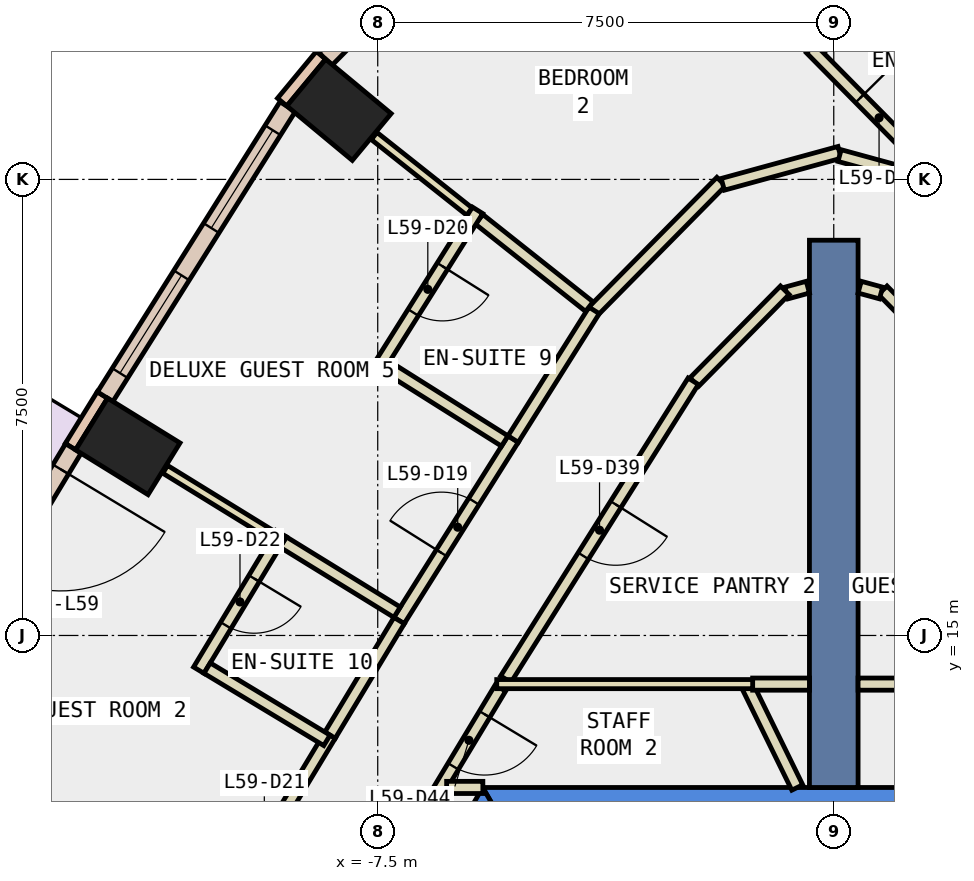
"""IFC4 building model, lengths in metres.
Left out: names, types, materials, properties, quantities, classifications, styles, units other than length and angle.
Written with IfcOpenShell. Run it as: python <this file> out.ifc"""

import sys

from ifc_helpers import new_model, si_unit, direction, frame, frame_2d, origin, origin_2d, place, context, subcontext, project, spatial, polyline, rectangle, outline, extrude, element, fill, save


model = new_model("IFC4")
c1 = context("Model", 3, precision=1e-05, world=origin(), true_north=direction((0.0, 1.0)))
c2 = subcontext(c1, "Body", "Model", "MODEL_VIEW")
j1 = project(units=[si_unit("LENGTHUNIT", "METRE"), si_unit("PLANEANGLEUNIT", "RADIAN")], contexts=[c1])
p1 = place(None, origin())
s1 = spatial("IfcSite", under=j1, at=p1, CompositionType="ELEMENT")
p2 = place(p1, origin())
s2 = spatial("IfcBuilding", under=s1, at=p2, CompositionType="ELEMENT")
p3 = place(p2, frame((0.0, 0.0, 259.4)))
s3 = spatial("IfcBuildingStorey", under=s2, at=p3, CompositionType="ELEMENT", Elevation=259.4)
for number, where, z_axis, x_axis in (
    (1, (-8.137, 23.645, -0.34), (0.0, 0.0, 1.0), (0.639, 0.769, 0.0)),
    (2, (-11.61, 18.109, -0.34), (0.0, 0.0, 1.0), (0.526, 0.851, 0.0)),
):
    element("IfcColumn", number, at=place(p3, frame(where, z_axis=z_axis, x_axis=x_axis)), inside=s3, PredefinedType="COLUMN", context=c2, shape_type="SweptSolid", body=[
        extrude(rectangle(XDim=1.0, YDim=1.4, at=origin_2d()), origin(), (0.0, 0.0, 1.0), 3.6),
    ])
p4 = place(p3, frame((0.0, 0.0, -0.34)))
e3 = element("IfcWall", 3, at=p4, inside=s3, PredefinedType="SHEAR", context=c2, shape_type="SweptSolid", body=[
    extrude(outline(polyline([(5.774, 12.5), (-5.774, 12.5), (-5.427, 11.9), (5.427, 11.9), (5.774, 12.5)])), origin(), (0.0, 0.0, 1.0), 3.6),
])
p5 = place(p3, frame((0.0, 0.0, -0.34)))
e4 = element("IfcWall", 4, at=p5, inside=s3, PredefinedType="SHEAR", context=c2, shape_type="SweptSolid", body=[
    extrude(outline(polyline([(-10.535, 4.253), (-10.015, 3.953), (-5.427, 11.9), (-5.774, 12.5), (-10.535, 4.253)])), origin(), (0.0, 0.0, 1.0), 3.6),
])
p6 = place(p3, frame((0.0, 12.5, -0.34), z_axis=(0.0, 0.0, 1.0), x_axis=(0.0, 1.0, 0.0)))
e5 = element("IfcWall", 5, at=p6, inside=s3, PredefinedType="SHEAR", context=c2, shape_type="SweptSolid", body=[
    extrude(rectangle(XDim=9.0, YDim=0.8, at=frame_2d((4.5, 0.0))), origin(), (0.0, 0.0, 1.0), 3.6),
])
p7 = place(p3, frame((-8.433, 24.541, 0.0), z_axis=(0.0, 0.0, 1.0), x_axis=(-0.637972365578, -0.770059257953, 0.0)))
e6 = element("IfcWall", 6, at=p7, inside=s3, PredefinedType="STANDARD", context=c2, shape_type="SweptSolid", body=[
    extrude(rectangle(XDim=1.0, YDim=0.2, at=frame_2d((0.5, 0.0))), origin(), (0.0, 0.0, 1.0), 3.26),
])
p8 = place(p3, frame((-12.028, 18.955, 0.0), z_axis=(0.0, 0.0, 1.0), x_axis=(-0.525648735675, -0.850701714282, 0.0)))
e7 = element("IfcWall", 7, at=p8, inside=s3, PredefinedType="STANDARD", context=c2, shape_type="SweptSolid", body=[
    extrude(rectangle(XDim=1.0, YDim=0.2, at=frame_2d((0.5, 0.0))), origin(), (0.0, 0.0, 1.0), 3.26),
])
p9 = place(p3, frame((-5.455, 27.424, 0.0), z_axis=(0.0, 0.0, 1.0), x_axis=(-0.702488411246, -0.711695181989, 0.0)))
e8 = element("IfcWall", 8, at=p9, inside=s3, PredefinedType="STANDARD", context=c2, shape_type="SweptSolid", body=[
    extrude(rectangle(XDim=4.137, YDim=0.3, at=frame_2d((2.068, 0.0))), origin(), (0.0, 0.0, 1.0), 3.26),
])
p10 = place(p9, frame((1.368, 0.0, 0.9)))
e9 = element("IfcOpeningElement", 9, at=p10, cuts=e8, PredefinedType="OPENING", context=c2, shape_type="SweptSolid", body=[
    extrude(rectangle(XDim=1.4, YDim=2.0, at=frame_2d((0.7, 1.0))), frame((0.0, 0.16, 0.0), z_axis=(0.0, -1.0, 0.0), x_axis=(1.0, 0.0, 0.0)), (0.0, 0.0, 1.0), 0.32),
])
p11 = place(p3, frame((-8.981, 23.697, 0.0), z_axis=(0.0, 0.0, 1.0), x_axis=(-0.532558226688, -0.846393369059, 0.0)))
e10 = element("IfcWall", 10, at=p11, inside=s3, PredefinedType="STANDARD", context=c2, shape_type="SweptSolid", body=[
    extrude(rectangle(XDim=5.637, YDim=0.3, at=frame_2d((2.818, 0.0))), origin(), (0.0, 0.0, 1.0), 3.26),
])
p12 = place(p11, frame((0.459, 0.0, 0.9)))
e11 = element("IfcOpeningElement", 11, at=p12, cuts=e10, PredefinedType="OPENING", context=c2, shape_type="SweptSolid", body=[
    extrude(rectangle(XDim=1.9, YDim=2.0, at=frame_2d((0.95, 1.0))), frame((0.0, 0.16, 0.0), z_axis=(0.0, -1.0, 0.0), x_axis=(1.0, 0.0, 0.0)), (0.0, 0.0, 1.0), 0.32),
])
p13 = place(p11, frame((3.278, 0.0, 0.9)))
e12 = element("IfcOpeningElement", 12, at=p13, cuts=e10, PredefinedType="OPENING", context=c2, shape_type="SweptSolid", body=[
    extrude(rectangle(XDim=1.9, YDim=2.0, at=frame_2d((0.95, 1.0))), frame((0.0, 0.16, 0.0), z_axis=(0.0, -1.0, 0.0), x_axis=(1.0, 0.0, 0.0)), (0.0, 0.0, 1.0), 0.32),
])
p14 = place(p3, frame((-12.506, 18.076, 0.0), z_axis=(0.0, 0.0, 1.0), x_axis=(-0.516269519619, -0.856426169096, 0.0)))
e13 = element("IfcWall", 13, at=p14, inside=s3, PredefinedType="STANDARD", context=c2, shape_type="SweptSolid", body=[
    extrude(rectangle(XDim=5.603, YDim=0.3, at=frame_2d((2.802, 0.0))), origin(), (0.0, 0.0, 1.0), 3.26),
])
p15 = place(p14, frame((0.401, 0.0, 0.0)))
e14 = element("IfcOpeningElement", 14, at=p15, cuts=e13, PredefinedType="OPENING", context=c2, shape_type="SweptSolid", body=[
    extrude(rectangle(XDim=2.0, YDim=2.4, at=frame_2d((1.0, 1.2))), frame((0.0, 0.16, 0.0), z_axis=(0.0, -1.0, 0.0), x_axis=(1.0, 0.0, 0.0)), (0.0, 0.0, 1.0), 0.32),
])
p16 = place(p14, frame((3.253, 0.0, 0.9)))
e15 = element("IfcOpeningElement", 15, at=p16, cuts=e13, PredefinedType="OPENING", context=c2, shape_type="SweptSolid", body=[
    extrude(rectangle(XDim=1.9, YDim=2.0, at=frame_2d((0.95, 1.0))), frame((0.0, 0.16, 0.0), z_axis=(0.0, -1.0, 0.0), x_axis=(1.0, 0.0, 0.0)), (0.0, 0.0, 1.0), 0.32),
])
p17 = place(p3, frame((-0.6, 12.5, 0.0), z_axis=(0.0, 0.0, 1.0), x_axis=(-0.440531456598, 0.897737175206, 0.0)))
e16 = element("IfcWall", 16, at=p17, inside=s3, PredefinedType="PARTITIONING", context=c2, shape_type="SweptSolid", body=[
    extrude(rectangle(XDim=1.918, YDim=0.2, at=frame_2d((0.959, 0.0))), origin(), (0.0, 0.0, 1.0), 3.26),
])
p18 = place(p3, frame((-5.482, 14.136, 0.0), z_axis=(0.0, 0.0, 1.0), x_axis=(-0.516156559549, -0.856494253357, 0.0)))
e17 = element("IfcWall", 17, at=p18, inside=s3, PredefinedType="PARTITIONING", context=c2, shape_type="SweptSolid", body=[
    extrude(rectangle(XDim=2.009, YDim=0.2, at=frame_2d((1.005, 0.0))), origin(), (0.0, 0.0, 1.0), 3.26),
])
p19 = place(p18, frame((0.504, 0.0, 0.0)))
e18 = element("IfcOpeningElement", 18, at=p19, cuts=e17, PredefinedType="OPENING", context=c2, shape_type="SweptSolid", body=[
    extrude(rectangle(XDim=1.0, YDim=2.1, at=frame_2d((0.5, 1.05))), frame((0.0, 0.11, 0.0), z_axis=(0.0, -1.0, 0.0), x_axis=(1.0, 0.0, 0.0)), (0.0, 0.0, 1.0), 0.22),
])
p20 = place(p3, frame((-6.367, 12.501, 0.0), z_axis=(0.0, 0.0, 1.0), x_axis=(1.0, 0.0, 0.0)))
e19 = element("IfcWall", 19, at=p20, inside=s3, PredefinedType="PARTITIONING", context=c2, shape_type="SweptSolid", body=[
    extrude(rectangle(XDim=0.596, YDim=0.2, at=frame_2d((0.298, 0.0))), origin(), (0.0, 0.0, 1.0), 3.26),
])
p21 = place(p3, frame((0.4, 14.2, 0.0), z_axis=(0.0, 0.0, 1.0), x_axis=(1.0, 0.0, 0.0)))
e20 = element("IfcWall", 20, at=p21, inside=s3, PredefinedType="PARTITIONING", context=c2, shape_type="SweptSolid", body=[
    extrude(rectangle(XDim=5.143, YDim=0.2, at=frame_2d((2.572, 0.0))), origin(), (0.0, 0.0, 1.0), 3.26),
])
p22 = place(p3, frame((2.294, 19.167, 0.0), z_axis=(0.0, 0.0, 1.0), x_axis=(-0.70213913596, 0.712039769784, 0.0)))
e21 = element("IfcWall", 21, at=p22, inside=s3, PredefinedType="PARTITIONING", context=c2, shape_type="SweptSolid", body=[
    extrude(rectangle(XDim=2.121, YDim=0.2, at=frame_2d((1.06, 0.0))), origin(), (0.0, 0.0, 1.0), 3.26),
])
p23 = place(p3, frame((0.778, 20.632, 0.0), z_axis=(0.0, 0.0, 1.0), x_axis=(-0.964810127056, 0.262947558899, 0.0)))
e22 = element("IfcWall", 22, at=p23, inside=s3, PredefinedType="PARTITIONING", context=c2, shape_type="SweptSolid", body=[
    extrude(rectangle(XDim=0.365, YDim=0.2, at=frame_2d((0.183, 0.0))), origin(), (0.0, 0.0, 1.0), 3.26),
])
p24 = place(p3, frame((-1.334, 14.2, 0.0), z_axis=(0.0, 0.0, 1.0), x_axis=(1.0, 0.0, 0.0)))
e23 = element("IfcWall", 23, at=p24, inside=s3, PredefinedType="PARTITIONING", context=c2, shape_type="SweptSolid", body=[
    extrude(rectangle(XDim=0.934, YDim=0.2, at=frame_2d((0.467, 0.0))), origin(), (0.0, 0.0, 1.0), 3.26),
])
p25 = place(p3, frame((-0.426, 20.728, 0.0), z_axis=(0.0, 0.0, 1.0), x_axis=(-0.964810127056, -0.262947558899, 0.0)))
e24 = element("IfcWall", 24, at=p25, inside=s3, PredefinedType="PARTITIONING", context=c2, shape_type="SweptSolid", body=[
    extrude(rectangle(XDim=0.365, YDim=0.2, at=frame_2d((0.183, 0.0))), origin(), (0.0, 0.0, 1.0), 3.26),
])
p26 = place(p3, frame((-0.805, 20.677, 0.0), z_axis=(0.0, 0.0, 1.0), x_axis=(-0.70213913596, -0.712039769784, 0.0)))
e25 = element("IfcWall", 25, at=p26, inside=s3, PredefinedType="PARTITIONING", context=c2, shape_type="SweptSolid", body=[
    extrude(rectangle(XDim=2.121, YDim=0.2, at=frame_2d((1.06, 0.0))), origin(), (0.0, 0.0, 1.0), 3.26),
])
p27 = place(p3, frame((-2.311, 19.181, 0.0), z_axis=(0.0, 0.0, 1.0), x_axis=(-0.532551510955, -0.846397594621, 0.0)))
e26 = element("IfcWall", 26, at=p27, inside=s3, PredefinedType="PARTITIONING", context=c2, shape_type="SweptSolid", body=[
    extrude(rectangle(XDim=5.789, YDim=0.2, at=frame_2d((2.895, 0.0))), origin(), (0.0, 0.0, 1.0), 3.26),
])
p28 = place(p27, frame((2.394, 0.0, 0.0)))
e27 = element("IfcOpeningElement", 27, at=p28, cuts=e26, PredefinedType="OPENING", context=c2, shape_type="SweptSolid", body=[
    extrude(rectangle(XDim=1.0, YDim=2.1, at=frame_2d((0.5, 1.05))), frame((0.0, 0.11, 0.0), z_axis=(0.0, -1.0, 0.0), x_axis=(1.0, 0.0, 0.0)), (0.0, 0.0, 1.0), 0.22),
])
p29 = place(p3, frame((-4.012, 20.275, 0.0), z_axis=(0.0, 0.0, 1.0), x_axis=(0.702488437915, 0.711695155664, 0.0)))
e28 = element("IfcWall", 28, at=p29, inside=s3, PredefinedType="PARTITIONING", context=c2, shape_type="SweptSolid", body=[
    extrude(rectangle(XDim=3.076, YDim=0.2, at=frame_2d((1.538, 0.0))), origin(), (0.0, 0.0, 1.0), 3.26),
])
p30 = place(p3, frame((-1.825, 22.419, 0.0), z_axis=(0.0, 0.0, 1.0), x_axis=(0.964477541401, 0.26416485787, 0.0)))
e29 = element("IfcWall", 29, at=p30, inside=s3, PredefinedType="PARTITIONING", context=c2, shape_type="SweptSolid", body=[
    extrude(rectangle(XDim=1.992, YDim=0.2, at=frame_2d((0.996, 0.0))), origin(), (0.0, 0.0, 1.0), 3.26),
])
p31 = place(p3, frame((0.096, 22.892, 0.0), z_axis=(0.0, 0.0, 1.0), x_axis=(0.964519582336, -0.264011316595, 0.0)))
e30 = element("IfcWall", 30, at=p31, inside=s3, PredefinedType="PARTITIONING", context=c2, shape_type="SweptSolid", body=[
    extrude(rectangle(XDim=1.849, YDim=0.2, at=frame_2d((0.924, 0.0))), origin(), (0.0, 0.0, 1.0), 3.26),
])
p32 = place(p3, frame((-7.15, 15.246, 0.0), z_axis=(0.0, 0.0, 1.0), x_axis=(0.532449518014, 0.846461759778, 0.0)))
e31 = element("IfcWall", 31, at=p32, inside=s3, PredefinedType="PARTITIONING", context=c2, shape_type="SweptSolid", body=[
    extrude(rectangle(XDim=3.525, YDim=0.2, at=frame_2d((1.763, 0.0))), origin(), (0.0, 0.0, 1.0), 3.26),
])
p33 = place(p32, frame((1.313, 0.0, 0.0)))
e32 = element("IfcOpeningElement", 32, at=p33, cuts=e31, PredefinedType="OPENING", context=c2, shape_type="SweptSolid", body=[
    extrude(rectangle(XDim=1.0, YDim=2.1, at=frame_2d((0.5, 1.05))), frame((0.0, 0.11, 0.0), z_axis=(0.0, -1.0, 0.0), x_axis=(1.0, 0.0, 0.0)), (0.0, 0.0, 1.0), 0.22),
])
p34 = place(p3, frame((-5.273, 18.23, 0.0), z_axis=(0.0, 0.0, 1.0), x_axis=(0.532743344325, 0.846276863135, 0.0)))
e33 = element("IfcWall", 33, at=p34, inside=s3, PredefinedType="PARTITIONING", context=c2, shape_type="SweptSolid", body=[
    extrude(rectangle(XDim=2.5, YDim=0.2, at=frame_2d((1.25, 0.0))), origin(), (0.0, 0.0, 1.0), 3.26),
])
p35 = place(p3, frame((-10.498, 9.689, 0.0), z_axis=(0.0, 0.0, 1.0), x_axis=(0.516353342298, 0.856375633643, 0.0)))
e34 = element("IfcWall", 34, at=p35, inside=s3, PredefinedType="PARTITIONING", context=c2, shape_type="SweptSolid", body=[
    extrude(rectangle(XDim=4.288, YDim=0.2, at=frame_2d((2.144, 0.0))), origin(), (0.0, 0.0, 1.0), 3.26),
])
p36 = place(p35, frame((1.694, 0.0, 0.0)))
e35 = element("IfcOpeningElement", 35, at=p36, cuts=e34, PredefinedType="OPENING", context=c2, shape_type="SweptSolid", body=[
    extrude(rectangle(XDim=1.0, YDim=2.1, at=frame_2d((0.5, 1.05))), frame((0.0, 0.11, 0.0), z_axis=(0.0, -1.0, 0.0), x_axis=(1.0, 0.0, 0.0)), (0.0, 0.0, 1.0), 0.22),
])
p37 = place(p3, frame((-8.284, 13.361, 0.0), z_axis=(0.0, 0.0, 1.0), x_axis=(0.516354965559, 0.856374654893, 0.0)))
e36 = element("IfcWall", 36, at=p37, inside=s3, PredefinedType="PARTITIONING", context=c2, shape_type="SweptSolid", body=[
    extrude(rectangle(XDim=2.2, YDim=0.2, at=frame_2d((1.1, 0.0))), origin(), (0.0, 0.0, 1.0), 3.26),
])
p38 = place(p3, frame((-1.334, 14.2, 0.0), z_axis=(0.0, 0.0, 1.0), x_axis=(-1.0, 0.0, 0.0)))
e37 = element("IfcWall", 37, at=p38, inside=s3, PredefinedType="PARTITIONING", context=c2, shape_type="SweptSolid", body=[
    extrude(rectangle(XDim=4.209, YDim=0.15, at=frame_2d((2.104, 0.0))), origin(), (0.0, 0.0, 1.0), 3.26),
])
p39 = place(p3, frame((1.506, 26.372, 0.0), z_axis=(0.0, 0.0, 1.0), x_axis=(-0.711773999329, -0.702408551969, 0.0)))
e38 = element("IfcWall", 38, at=p39, inside=s3, PredefinedType="PARTITIONING", context=c2, shape_type="SweptSolid", body=[
    extrude(rectangle(XDim=2.45, YDim=0.2, at=frame_2d((1.225, 0.0))), origin(), (0.0, 0.0, 1.0), 3.26),
])
p40 = place(p3, frame((-0.379, 24.652, 0.0), z_axis=(0.0, 0.0, 1.0), x_axis=(0.702559610983, -0.711624896286, 0.0)))
e39 = element("IfcWall", 39, at=p40, inside=s3, PredefinedType="PARTITIONING", context=c2, shape_type="SweptSolid", body=[
    extrude(rectangle(XDim=3.124, YDim=0.2, at=frame_2d((1.562, 0.0))), origin(), (0.0, 0.0, 1.0), 3.26),
])
p41 = place(p40, frame((1.15, 0.0, 0.0)))
e40 = element("IfcOpeningElement", 40, at=p41, cuts=e39, PredefinedType="OPENING", context=c2, shape_type="SweptSolid", body=[
    extrude(rectangle(XDim=0.9, YDim=2.1, at=frame_2d((0.45, 1.05))), frame((0.0, 0.11, 0.0), z_axis=(0.0, -1.0, 0.0), x_axis=(1.0, 0.0, 0.0)), (0.0, 0.0, 1.0), 0.22),
])
p42 = place(p3, frame((-5.99, 21.97, 0.0), z_axis=(0.0, 0.0, 1.0), x_axis=(-0.783573405437, 0.621299218003, 0.0)))
e41 = element("IfcWall", 41, at=p42, inside=s3, PredefinedType="PARTITIONING", context=c2, shape_type="SweptSolid", body=[
    extrude(rectangle(XDim=2.002, YDim=0.15, at=frame_2d((1.001, 0.0))), origin(), (0.0, 0.0, 1.0), 3.26),
])
p43 = place(p3, frame((-4.02, 20.408, 0.0), z_axis=(0.0, 0.0, 1.0), x_axis=(-0.783681902275, 0.621162358846, 0.0)))
e42 = element("IfcWall", 42, at=p43, inside=s3, PredefinedType="PARTITIONING", context=c2, shape_type="SweptSolid", body=[
    extrude(rectangle(XDim=2.313, YDim=0.2, at=frame_2d((1.157, 0.0))), origin(), (0.0, 0.0, 1.0), 3.26),
])
p44 = place(p3, frame((-5.858, 21.992, 0.0), z_axis=(0.0, 0.0, 1.0), x_axis=(-0.532874387162, -0.846194355634, 0.0)))
e43 = element("IfcWall", 43, at=p44, inside=s3, PredefinedType="PARTITIONING", context=c2, shape_type="SweptSolid", body=[
    extrude(rectangle(XDim=3.073, YDim=0.2, at=frame_2d((1.536, 0.0))), origin(), (0.0, 0.0, 1.0), 3.26),
])
p45 = place(p44, frame((1.086, 0.0, 0.0)))
e44 = element("IfcOpeningElement", 44, at=p45, cuts=e43, PredefinedType="OPENING", context=c2, shape_type="SweptSolid", body=[
    extrude(rectangle(XDim=0.9, YDim=2.1, at=frame_2d((0.45, 1.05))), frame((0.0, 0.11, 0.0), z_axis=(0.0, -1.0, 0.0), x_axis=(1.0, 0.0, 0.0)), (0.0, 0.0, 1.0), 0.22),
])
p46 = place(p3, frame((-7.357, 19.423, 0.0), z_axis=(0.0, 0.0, 1.0), x_axis=(0.846270070045, -0.532754135176, 0.0)))
e45 = element("IfcWall", 45, at=p46, inside=s3, PredefinedType="PARTITIONING", context=c2, shape_type="SweptSolid", body=[
    extrude(rectangle(XDim=2.3, YDim=0.2, at=frame_2d((1.15, 0.0))), origin(), (0.0, 0.0, 1.0), 3.26),
])
p47 = place(p3, frame((-9.225, 16.641, 0.0), z_axis=(0.0, 0.0, 1.0), x_axis=(-0.85144868382, 0.524437926566, 0.0)))
e46 = element("IfcWall", 46, at=p47, inside=s3, PredefinedType="PARTITIONING", context=c2, shape_type="SweptSolid", body=[
    extrude(rectangle(XDim=2.08, YDim=0.15, at=frame_2d((1.04, 0.0))), origin(), (0.0, 0.0, 1.0), 3.26),
])
p48 = place(p3, frame((-7.182, 15.383, 0.0), z_axis=(0.0, 0.0, 1.0), x_axis=(-0.851498142432, 0.524357619792, 0.0)))
e47 = element("IfcWall", 47, at=p48, inside=s3, PredefinedType="PARTITIONING", context=c2, shape_type="SweptSolid", body=[
    extrude(rectangle(XDim=2.198, YDim=0.2, at=frame_2d((1.099, 0.0))), origin(), (0.0, 0.0, 1.0), 3.26),
])
p49 = place(p3, frame((-9.088, 16.674, 0.0), z_axis=(0.0, 0.0, 1.0), x_axis=(-0.516780274192, -0.856118069081, 0.0)))
e48 = element("IfcWall", 48, at=p49, inside=s3, PredefinedType="PARTITIONING", context=c2, shape_type="SweptSolid", body=[
    extrude(rectangle(XDim=2.623, YDim=0.2, at=frame_2d((1.311, 0.0))), origin(), (0.0, 0.0, 1.0), 3.26),
])
p50 = place(p49, frame((0.861, 0.0, 0.0)))
e49 = element("IfcOpeningElement", 49, at=p50, cuts=e48, PredefinedType="OPENING", context=c2, shape_type="SweptSolid", body=[
    extrude(rectangle(XDim=0.9, YDim=2.1, at=frame_2d((0.45, 1.05))), frame((0.0, 0.11, 0.0), z_axis=(0.0, -1.0, 0.0), x_axis=(1.0, 0.0, 0.0)), (0.0, 0.0, 1.0), 0.22),
])
p51 = place(p3, frame((-10.306, 14.463, 0.0), z_axis=(0.0, 0.0, 1.0), x_axis=(0.856338986581, -0.51641411683, 0.0)))
e50 = element("IfcWall", 50, at=p51, inside=s3, PredefinedType="PARTITIONING", context=c2, shape_type="SweptSolid", body=[
    extrude(rectangle(XDim=2.301, YDim=0.2, at=frame_2d((1.15, 0.0))), origin(), (0.0, 0.0, 1.0), 3.26),
])
p52 = place(p12, origin())
e51 = element("IfcWindow", 51, at=p52, inside=s3, PartitioningType="SINGLE_PANEL", PredefinedType="WINDOW", context=c2, shape_type="SweptSolid", body=[
    extrude(rectangle(XDim=1.9, YDim=2.0, at=frame_2d((0.95, 1.0))), frame((0.0, 0.03, 0.0), z_axis=(0.0, -1.0, 0.0), x_axis=(1.0, 0.0, 0.0)), (0.0, 0.0, 1.0), 0.06),
])
fill(e11, e51)
p53 = place(p13, origin())
e52 = element("IfcWindow", 52, at=p53, inside=s3, PartitioningType="SINGLE_PANEL", PredefinedType="WINDOW", context=c2, shape_type="SweptSolid", body=[
    extrude(rectangle(XDim=1.9, YDim=2.0, at=frame_2d((0.95, 1.0))), frame((0.0, 0.03, 0.0), z_axis=(0.0, -1.0, 0.0), x_axis=(1.0, 0.0, 0.0)), (0.0, 0.0, 1.0), 0.06),
])
fill(e12, e52)
p54 = place(p15, origin())
e53 = element("IfcDoor", 53, at=p54, inside=s3, OperationType="SLIDING_TO_LEFT", PredefinedType="DOOR", context=c2, shape_type="SweptSolid", body=[
    extrude(rectangle(XDim=2.0, YDim=2.4, at=frame_2d((1.0, 1.2))), frame((0.0, 0.025, 0.0), z_axis=(0.0, -1.0, 0.0), x_axis=(1.0, 0.0, 0.0)), (0.0, 0.0, 1.0), 0.05),
])
fill(e14, e53)
p55 = place(p41, origin())
e54 = element("IfcDoor", 54, at=p55, inside=s3, OperationType="SINGLE_SWING_RIGHT", PredefinedType="DOOR", context=c2, shape_type="SweptSolid", body=[
    extrude(rectangle(XDim=0.9, YDim=2.1, at=frame_2d((0.45, 1.05))), frame((0.0, 0.025, 0.0), z_axis=(0.0, -1.0, 0.0), x_axis=(1.0, 0.0, 0.0)), (0.0, 0.0, 1.0), 0.05),
])
fill(e40, e54)
p56 = place(p33, origin())
e55 = element("IfcDoor", 55, at=p56, inside=s3, OperationType="SINGLE_SWING_RIGHT", PredefinedType="DOOR", context=c2, shape_type="SweptSolid", body=[
    extrude(rectangle(XDim=1.0, YDim=2.1, at=frame_2d((0.5, 1.05))), frame((0.0, 0.025, 0.0), z_axis=(0.0, -1.0, 0.0), x_axis=(1.0, 0.0, 0.0)), (0.0, 0.0, 1.0), 0.05),
])
fill(e32, e55)
p57 = place(p45, origin())
e56 = element("IfcDoor", 56, at=p57, inside=s3, OperationType="SINGLE_SWING_LEFT", PredefinedType="DOOR", context=c2, shape_type="SweptSolid", body=[
    extrude(rectangle(XDim=0.9, YDim=2.1, at=frame_2d((0.45, 1.05))), frame((0.0, 0.025, 0.0), z_axis=(0.0, -1.0, 0.0), x_axis=(1.0, 0.0, 0.0)), (0.0, 0.0, 1.0), 0.05),
])
fill(e44, e56)
p58 = place(p50, origin())
e57 = element("IfcDoor", 57, at=p58, inside=s3, OperationType="SINGLE_SWING_LEFT", PredefinedType="DOOR", context=c2, shape_type="SweptSolid", body=[
    extrude(rectangle(XDim=0.9, YDim=2.1, at=frame_2d((0.45, 1.05))), frame((0.0, 0.025, 0.0), z_axis=(0.0, -1.0, 0.0), x_axis=(1.0, 0.0, 0.0)), (0.0, 0.0, 1.0), 0.05),
])
fill(e49, e57)
p59 = place(p28, origin())
e58 = element("IfcDoor", 58, at=p59, inside=s3, OperationType="SINGLE_SWING_LEFT", PredefinedType="DOOR", context=c2, shape_type="SweptSolid", body=[
    extrude(rectangle(XDim=1.0, YDim=2.1, at=frame_2d((0.5, 1.05))), frame((0.0, 0.025, 0.0), z_axis=(0.0, -1.0, 0.0), x_axis=(1.0, 0.0, 0.0)), (0.0, 0.0, 1.0), 0.05),
])
fill(e27, e58)
p60 = place(p19, origin())
e59 = element("IfcDoor", 59, at=p60, inside=s3, OperationType="SINGLE_SWING_LEFT", PredefinedType="DOOR", context=c2, shape_type="SweptSolid", body=[
    extrude(rectangle(XDim=1.0, YDim=2.1, at=frame_2d((0.5, 1.05))), frame((0.0, 0.025, 0.0), z_axis=(0.0, -1.0, 0.0), x_axis=(1.0, 0.0, 0.0)), (0.0, 0.0, 1.0), 0.05),
])
fill(e18, e59)
save(model, sys.argv[1])
